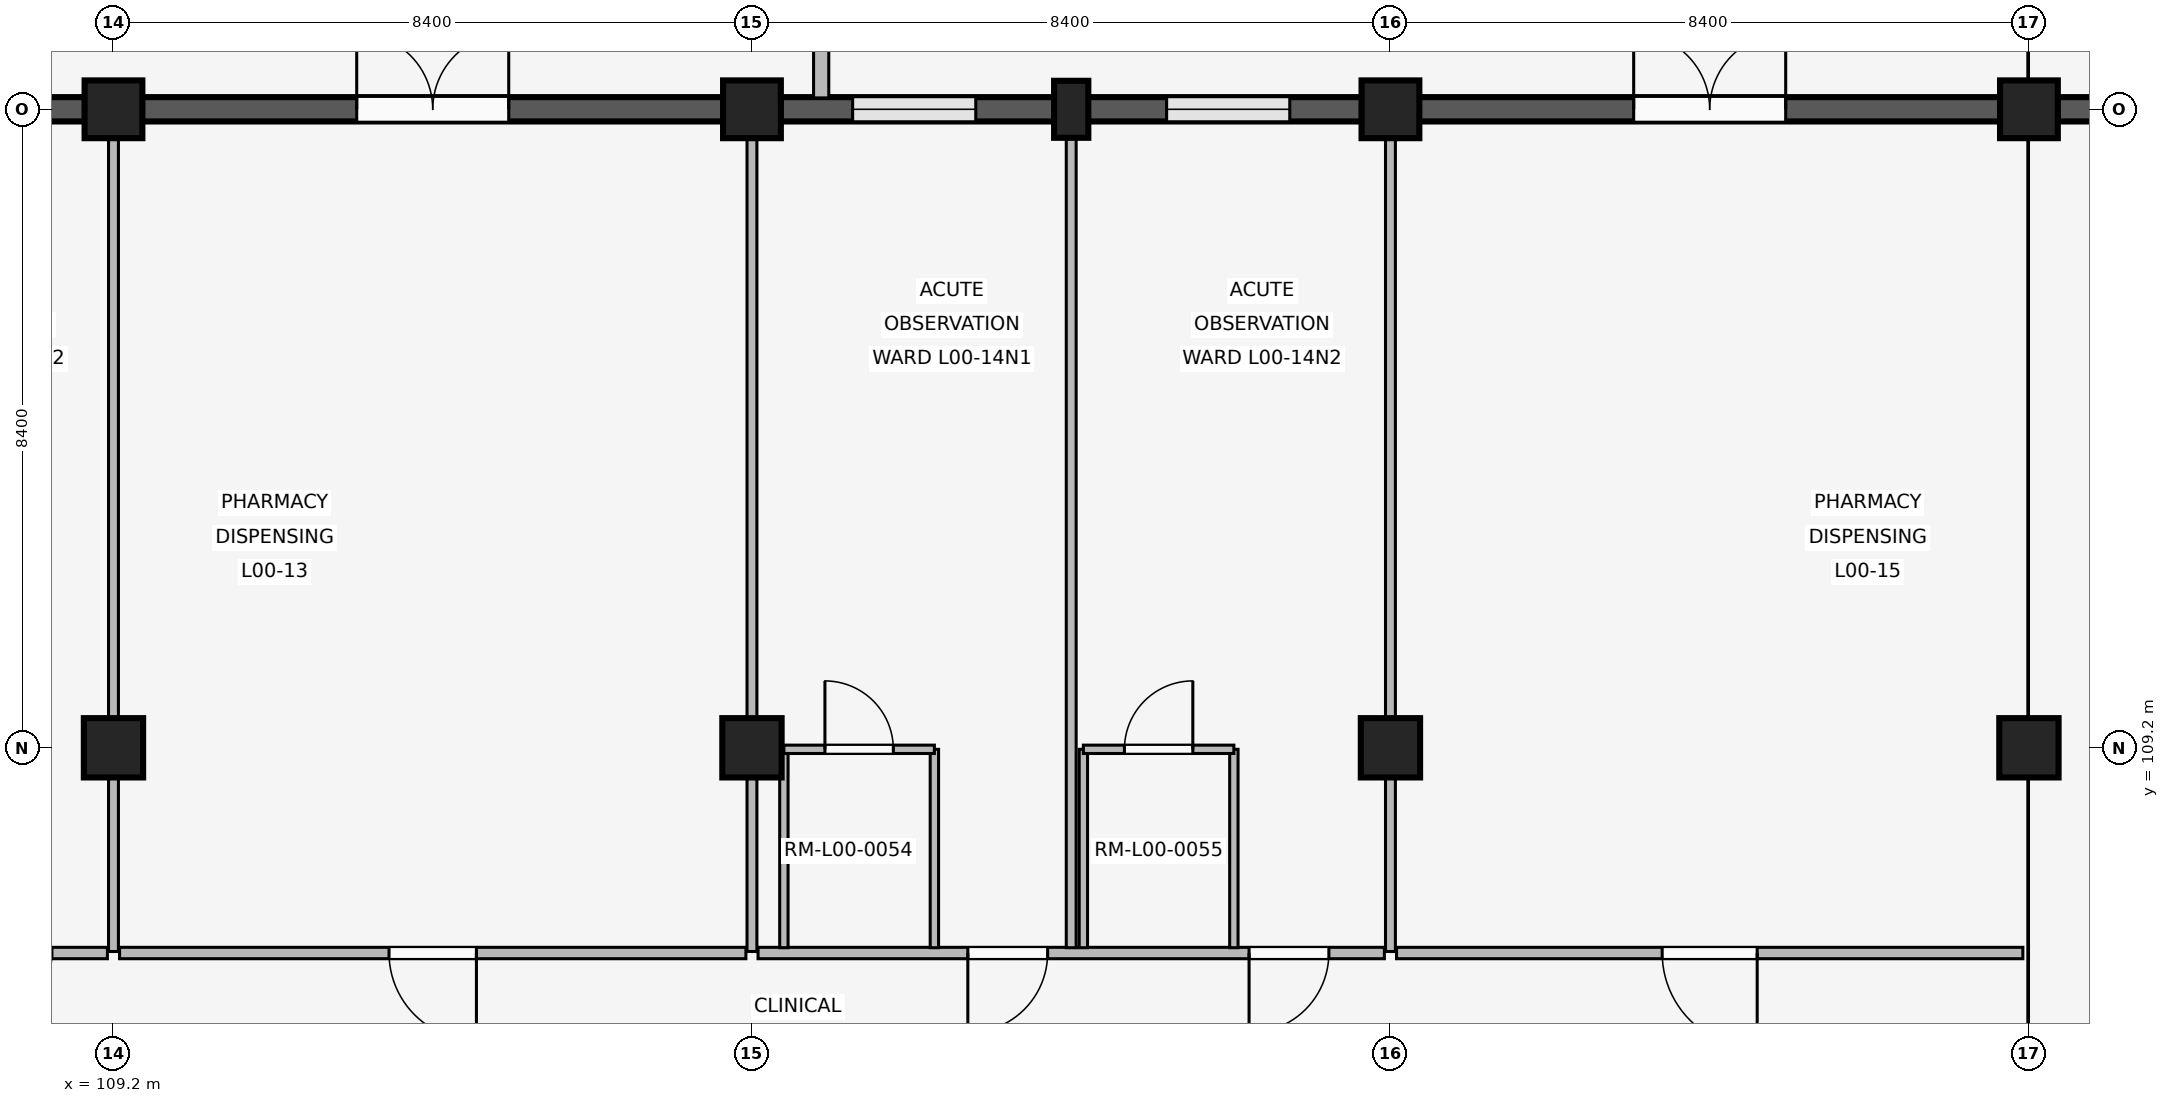
"""IFC4 building model, lengths in metres.
Left out: names, types, materials, properties, quantities, classifications, styles, units other than length and angle.
Written with IfcOpenShell. Run it as: python <this file> out.ifc"""

import sys

from ifc_helpers import new_model, si_unit, direction, frame, frame_2d, origin, origin_2d, place, context, subcontext, project, spatial, rectangle, extrude, element, fill, save


model = new_model("IFC4")
c1 = context("Model", 3, precision=1e-05, world=origin(), true_north=direction((0.0, 1.0)))
c2 = subcontext(c1, "Body", "Model", "MODEL_VIEW")
j1 = project(units=[si_unit("LENGTHUNIT", "METRE"), si_unit("PLANEANGLEUNIT", "RADIAN")], contexts=[c1])
p1 = place(None, origin())
s1 = spatial("IfcSite", under=j1, at=p1, CompositionType="ELEMENT")
p2 = place(p1, origin())
s2 = spatial("IfcBuilding", under=s1, at=p2, CompositionType="ELEMENT")
p3 = place(p2, origin())
s3 = spatial("IfcBuildingStorey", under=s2, at=p3, CompositionType="ELEMENT", Elevation=0.0)
p4 = place(p3, frame((109.2, 109.2, 0.0), z_axis=(0.0, 0.0, 1.0), x_axis=(1.0, 0.0, 0.0)))
e1 = element("IfcColumn", 1, at=p4, inside=s3, PredefinedType="COLUMN", context=c2, shape_type="SweptSolid", body=[
    extrude(rectangle(XDim=0.78, YDim=0.78, at=origin_2d()), origin(), (0.0, 0.0, 1.0), 4.8),
])
p5 = place(p3, frame((109.2, 117.6, 0.0), z_axis=(0.0, 0.0, 1.0), x_axis=(1.0, 0.0, 0.0)))
e2 = element("IfcColumn", 2, at=p5, inside=s3, PredefinedType="COLUMN", context=c2, shape_type="SweptSolid", body=[
    extrude(rectangle(XDim=0.76, YDim=0.76, at=origin_2d()), origin(), (0.0, 0.0, 1.0), 4.8),
])
p6 = place(p3, frame((117.6, 109.2, 0.0), z_axis=(0.0, 0.0, 1.0), x_axis=(1.0, 0.0, 0.0)))
e3 = element("IfcColumn", 3, at=p6, inside=s3, PredefinedType="COLUMN", context=c2, shape_type="SweptSolid", body=[
    extrude(rectangle(XDim=0.78, YDim=0.78, at=origin_2d()), origin(), (0.0, 0.0, 1.0), 4.8),
])
p7 = place(p3, frame((117.6, 117.6, 0.0), z_axis=(0.0, 0.0, 1.0), x_axis=(1.0, 0.0, 0.0)))
e4 = element("IfcColumn", 4, at=p7, inside=s3, PredefinedType="COLUMN", context=c2, shape_type="SweptSolid", body=[
    extrude(rectangle(XDim=0.76, YDim=0.76, at=origin_2d()), origin(), (0.0, 0.0, 1.0), 4.8),
])
p8 = place(p3, frame((126.0, 109.2, 0.0), z_axis=(0.0, 0.0, 1.0), x_axis=(1.0, 0.0, 0.0)))
e5 = element("IfcColumn", 5, at=p8, inside=s3, PredefinedType="COLUMN", context=c2, shape_type="SweptSolid", body=[
    extrude(rectangle(XDim=0.78, YDim=0.78, at=origin_2d()), origin(), (0.0, 0.0, 1.0), 4.8),
])
p9 = place(p3, frame((126.0, 117.6, 0.0), z_axis=(0.0, 0.0, 1.0), x_axis=(1.0, 0.0, 0.0)))
e6 = element("IfcColumn", 6, at=p9, inside=s3, PredefinedType="COLUMN", context=c2, shape_type="SweptSolid", body=[
    extrude(rectangle(XDim=0.76, YDim=0.76, at=origin_2d()), origin(), (0.0, 0.0, 1.0), 4.8),
])
p10 = place(p3, frame((134.4, 109.2, 0.0), z_axis=(0.0, 0.0, 1.0), x_axis=(1.0, 0.0, 0.0)))
e7 = element("IfcColumn", 7, at=p10, inside=s3, PredefinedType="COLUMN", context=c2, shape_type="SweptSolid", body=[
    extrude(rectangle(XDim=0.78, YDim=0.78, at=origin_2d()), origin(), (0.0, 0.0, 1.0), 4.8),
])
p11 = place(p3, frame((134.4, 117.6, 0.0), z_axis=(0.0, 0.0, 1.0), x_axis=(1.0, 0.0, 0.0)))
e8 = element("IfcColumn", 8, at=p11, inside=s3, PredefinedType="COLUMN", context=c2, shape_type="SweptSolid", body=[
    extrude(rectangle(XDim=0.76, YDim=0.76, at=origin_2d()), origin(), (0.0, 0.0, 1.0), 4.8),
])
p12 = place(p3, frame((121.8, 117.6, 0.0), z_axis=(0.0, 0.0, 1.0), x_axis=(1.0, 0.0, 0.0)))
e9 = element("IfcColumn", 9, at=p12, inside=s3, PredefinedType="PILASTER", context=c2, shape_type="SweptSolid", body=[
    extrude(rectangle(XDim=0.45, YDim=0.75, at=origin_2d()), origin(), (0.0, 0.0, 1.0), 4.8),
])
p13 = place(p3, frame((101.175, 117.6, 0.0), z_axis=(0.0, 0.0, 1.0), x_axis=(1.0, 0.0, 0.0)))
e10 = element("IfcWall", 10, at=p13, inside=s3, PredefinedType="SOLIDWALL", context=c2, shape_type="SweptSolid", body=[
    extrude(rectangle(XDim=7.65, YDim=0.32, at=frame_2d((3.825, 0.0))), origin(), (0.0, 0.0, 1.0), 3.82),
])
p14 = place(p13, frame((1.119, 0.0, 0.85)))
e11 = element("IfcOpeningElement", 11, at=p14, cuts=e10, PredefinedType="OPENING", context=c2, shape_type="SweptSolid", body=[
    extrude(rectangle(XDim=1.28, YDim=1.38, at=frame_2d((0.64, 0.69))), frame((0.0, 0.17, 0.0), z_axis=(0.0, -1.0, 0.0), x_axis=(1.0, 0.0, 0.0)), (0.0, 0.0, 1.0), 0.34),
])
p15 = place(p13, frame((5.25, 0.0, 0.85)))
e12 = element("IfcOpeningElement", 12, at=p15, cuts=e10, PredefinedType="OPENING", context=c2, shape_type="SweptSolid", body=[
    extrude(rectangle(XDim=1.28, YDim=1.38, at=frame_2d((0.64, 0.69))), frame((0.0, 0.17, 0.0), z_axis=(0.0, -1.0, 0.0), x_axis=(1.0, 0.0, 0.0)), (0.0, 0.0, 1.0), 0.34),
])
p16 = place(p3, frame((109.575, 117.6, 0.0), z_axis=(0.0, 0.0, 1.0), x_axis=(1.0, 0.0, 0.0)))
e13 = element("IfcWall", 13, at=p16, inside=s3, PredefinedType="SOLIDWALL", context=c2, shape_type="SweptSolid", body=[
    extrude(rectangle(XDim=7.65, YDim=0.32, at=frame_2d((3.825, 0.0))), origin(), (0.0, 0.0, 1.0), 3.82),
])
p17 = place(p16, frame((2.825, 0.0, 0.0)))
e14 = element("IfcOpeningElement", 14, at=p17, cuts=e13, PredefinedType="OPENING", context=c2, shape_type="SweptSolid", body=[
    extrude(rectangle(XDim=2.0, YDim=2.4, at=frame_2d((1.0, 1.2))), frame((0.0, 0.17, 0.0), z_axis=(0.0, -1.0, 0.0), x_axis=(1.0, 0.0, 0.0)), (0.0, 0.0, 1.0), 0.34),
])
p18 = place(p3, frame((117.975, 117.6, 0.0), z_axis=(0.0, 0.0, 1.0), x_axis=(1.0, 0.0, 0.0)))
e15 = element("IfcWall", 15, at=p18, inside=s3, PredefinedType="SOLIDWALL", context=c2, shape_type="SweptSolid", body=[
    extrude(rectangle(XDim=7.65, YDim=0.32, at=frame_2d((3.825, 0.0))), origin(), (0.0, 0.0, 1.0), 3.82),
])
p19 = place(p18, frame((0.949, 0.0, 0.85)))
e16 = element("IfcOpeningElement", 16, at=p19, cuts=e15, PredefinedType="OPENING", context=c2, shape_type="SweptSolid", body=[
    extrude(rectangle(XDim=1.62, YDim=1.52, at=frame_2d((0.81, 0.76))), frame((0.0, 0.17, 0.0), z_axis=(0.0, -1.0, 0.0), x_axis=(1.0, 0.0, 0.0)), (0.0, 0.0, 1.0), 0.34),
])
p20 = place(p18, frame((5.081, 0.0, 0.85)))
e17 = element("IfcOpeningElement", 17, at=p20, cuts=e15, PredefinedType="OPENING", context=c2, shape_type="SweptSolid", body=[
    extrude(rectangle(XDim=1.62, YDim=1.52, at=frame_2d((0.81, 0.76))), frame((0.0, 0.17, 0.0), z_axis=(0.0, -1.0, 0.0), x_axis=(1.0, 0.0, 0.0)), (0.0, 0.0, 1.0), 0.34),
])
p21 = place(p3, frame((118.51, 117.75, 0.0), z_axis=(0.0, 0.0, 1.0), x_axis=(0.0, 1.0, 0.0)))
e18 = element("IfcWall", 18, at=p21, inside=s3, PredefinedType="ELEMENTEDWALL", context=c2, shape_type="SweptSolid", body=[
    extrude(rectangle(XDim=0.85, YDim=0.2, at=frame_2d((0.425, 0.0))), origin(), (0.0, 0.0, 1.0), 3.8),
])
p22 = place(p3, frame((126.375, 117.6, 0.0), z_axis=(0.0, 0.0, 1.0), x_axis=(1.0, 0.0, 0.0)))
e19 = element("IfcWall", 19, at=p22, inside=s3, PredefinedType="SOLIDWALL", context=c2, shape_type="SweptSolid", body=[
    extrude(rectangle(XDim=7.65, YDim=0.32, at=frame_2d((3.825, 0.0))), origin(), (0.0, 0.0, 1.0), 3.82),
])
p23 = place(p22, frame((2.825, 0.0, 0.0)))
e20 = element("IfcOpeningElement", 20, at=p23, cuts=e19, PredefinedType="OPENING", context=c2, shape_type="SweptSolid", body=[
    extrude(rectangle(XDim=2.0, YDim=2.4, at=frame_2d((1.0, 1.2))), frame((0.0, 0.17, 0.0), z_axis=(0.0, -1.0, 0.0), x_axis=(1.0, 0.0, 0.0)), (0.0, 0.0, 1.0), 0.34),
])
p24 = place(p3, frame((134.775, 117.6, 0.0), z_axis=(0.0, 0.0, 1.0), x_axis=(1.0, 0.0, 0.0)))
e21 = element("IfcWall", 21, at=p24, inside=s3, PredefinedType="SOLIDWALL", context=c2, shape_type="SweptSolid", body=[
    extrude(rectangle(XDim=7.65, YDim=0.32, at=frame_2d((3.825, 0.0))), origin(), (0.0, 0.0, 1.0), 3.82),
])
p25 = place(p24, frame((1.0, 0.0, 0.85)))
e22 = element("IfcOpeningElement", 22, at=p25, cuts=e21, PredefinedType="OPENING", context=c2, shape_type="SweptSolid", body=[
    extrude(rectangle(XDim=1.52, YDim=1.65, at=frame_2d((0.76, 0.825))), frame((0.0, 0.17, 0.0), z_axis=(0.0, -1.0, 0.0), x_axis=(1.0, 0.0, 0.0)), (0.0, 0.0, 1.0), 0.34),
])
p26 = place(p24, frame((5.131, 0.0, 0.85)))
e23 = element("IfcOpeningElement", 23, at=p26, cuts=e21, PredefinedType="OPENING", context=c2, shape_type="SweptSolid", body=[
    extrude(rectangle(XDim=1.52, YDim=1.65, at=frame_2d((0.76, 0.825))), frame((0.0, 0.17, 0.0), z_axis=(0.0, -1.0, 0.0), x_axis=(1.0, 0.0, 0.0)), (0.0, 0.0, 1.0), 0.34),
])
p27 = place(p3, frame((109.12, 106.5, 0.0), z_axis=(0.0, 0.0, 1.0), x_axis=(-1.0, 0.0, 0.0)))
e24 = element("IfcWall", 24, at=p27, inside=s3, PredefinedType="PARTITIONING", context=c2, shape_type="SweptSolid", body=[
    extrude(rectangle(XDim=8.24, YDim=0.15, at=frame_2d((4.12, 0.0))), origin(), (0.0, 0.0, 1.0), 3.8),
])
p28 = place(p27, frame((0.73, 0.0, 0.0)))
e25 = element("IfcOpeningElement", 25, at=p28, cuts=e24, PredefinedType="OPENING", context=c2, shape_type="SweptSolid", body=[
    extrude(rectangle(XDim=1.05, YDim=2.2, at=frame_2d((0.525, 1.1))), frame((0.0, 0.085, 0.0), z_axis=(0.0, -1.0, 0.0), x_axis=(1.0, 0.0, 0.0)), (0.0, 0.0, 1.0), 0.17),
])
p29 = place(p27, frame((4.43, 0.0, 0.0)))
e26 = element("IfcOpeningElement", 26, at=p29, cuts=e24, PredefinedType="OPENING", context=c2, shape_type="SweptSolid", body=[
    extrude(rectangle(XDim=1.05, YDim=2.2, at=frame_2d((0.525, 1.1))), frame((0.0, 0.085, 0.0), z_axis=(0.0, -1.0, 0.0), x_axis=(1.0, 0.0, 0.0)), (0.0, 0.0, 1.0), 0.17),
])
p30 = place(p3, frame((109.2, 106.52, 0.0), z_axis=(0.0, 0.0, 1.0), x_axis=(0.0, 1.0, 0.0)))
e27 = element("IfcWall", 27, at=p30, inside=s3, PredefinedType="PARTITIONING", context=c2, shape_type="SweptSolid", body=[
    extrude(rectangle(XDim=10.94, YDim=0.13, at=frame_2d((5.47, 0.0))), origin(), (0.0, 0.0, 1.0), 3.8),
])
p31 = place(p3, frame((117.52, 106.5, 0.0), z_axis=(0.0, 0.0, 1.0), x_axis=(-1.0, 0.0, 0.0)))
e28 = element("IfcWall", 28, at=p31, inside=s3, PredefinedType="PARTITIONING", context=c2, shape_type="SweptSolid", body=[
    extrude(rectangle(XDim=8.24, YDim=0.15, at=frame_2d((4.12, 0.0))), origin(), (0.0, 0.0, 1.0), 3.8),
])
p32 = place(p31, frame((3.545, 0.0, 0.0)))
e29 = element("IfcOpeningElement", 29, at=p32, cuts=e28, PredefinedType="OPENING", context=c2, shape_type="SweptSolid", body=[
    extrude(rectangle(XDim=1.15, YDim=2.2, at=frame_2d((0.575, 1.1))), frame((0.0, 0.085, 0.0), z_axis=(0.0, -1.0, 0.0), x_axis=(1.0, 0.0, 0.0)), (0.0, 0.0, 1.0), 0.17),
])
p33 = place(p3, frame((117.6, 106.52, 0.0), z_axis=(0.0, 0.0, 1.0), x_axis=(0.0, 1.0, 0.0)))
e30 = element("IfcWall", 30, at=p33, inside=s3, PredefinedType="PARTITIONING", context=c2, shape_type="SweptSolid", body=[
    extrude(rectangle(XDim=10.94, YDim=0.13, at=frame_2d((5.47, 0.0))), origin(), (0.0, 0.0, 1.0), 3.8),
])
p34 = place(p3, frame((125.92, 106.5, 0.0), z_axis=(0.0, 0.0, 1.0), x_axis=(-1.0, 0.0, 0.0)))
e31 = element("IfcWall", 31, at=p34, inside=s3, PredefinedType="PARTITIONING", context=c2, shape_type="SweptSolid", body=[
    extrude(rectangle(XDim=8.24, YDim=0.15, at=frame_2d((4.12, 0.0))), origin(), (0.0, 0.0, 1.0), 3.8),
])
p35 = place(p34, frame((0.73, 0.0, 0.0)))
e32 = element("IfcOpeningElement", 32, at=p35, cuts=e31, PredefinedType="OPENING", context=c2, shape_type="SweptSolid", body=[
    extrude(rectangle(XDim=1.05, YDim=2.2, at=frame_2d((0.525, 1.1))), frame((0.0, 0.085, 0.0), z_axis=(0.0, -1.0, 0.0), x_axis=(1.0, 0.0, 0.0)), (0.0, 0.0, 1.0), 0.17),
])
p36 = place(p34, frame((4.43, 0.0, 0.0)))
e33 = element("IfcOpeningElement", 33, at=p36, cuts=e31, PredefinedType="OPENING", context=c2, shape_type="SweptSolid", body=[
    extrude(rectangle(XDim=1.05, YDim=2.2, at=frame_2d((0.525, 1.1))), frame((0.0, 0.085, 0.0), z_axis=(0.0, -1.0, 0.0), x_axis=(1.0, 0.0, 0.0)), (0.0, 0.0, 1.0), 0.17),
])
p37 = place(p3, frame((121.8, 106.57, 0.0), z_axis=(0.0, 0.0, 1.0), x_axis=(0.0, 1.0, 0.0)))
e34 = element("IfcWall", 34, at=p37, inside=s3, PredefinedType="PARTITIONING", context=c2, shape_type="SweptSolid", body=[
    extrude(rectangle(XDim=10.93, YDim=0.13, at=frame_2d((5.465, 0.0))), origin(), (0.0, 0.0, 1.0), 3.8),
])
for number, where, z_axis, x_axis in (
    (35, (118.02, 106.57, 0.0), (0.0, 0.0, 1.0), (0.0, 1.0, 0.0)),
    (36, (120.0, 106.57, 0.0), (0.0, 0.0, 1.0), (0.0, 1.0, 0.0)),
):
    element("IfcWall", number, at=place(p3, frame(where, z_axis=z_axis, x_axis=x_axis)), inside=s3, PredefinedType="PARTITIONING", context=c2, shape_type="SweptSolid", body=[
        extrude(rectangle(XDim=2.61, YDim=0.11, at=frame_2d((1.305, 0.0))), origin(), (0.0, 0.0, 1.0), 3.8),
    ])
p38 = place(p3, frame((118.02, 109.18, 0.0), z_axis=(0.0, 0.0, 1.0), x_axis=(1.0, 0.0, 0.0)))
e37 = element("IfcWall", 37, at=p38, inside=s3, PredefinedType="PARTITIONING", context=c2, shape_type="SweptSolid", body=[
    extrude(rectangle(XDim=1.98, YDim=0.11, at=frame_2d((0.99, 0.0))), origin(), (0.0, 0.0, 1.0), 3.8),
])
p39 = place(p38, frame((0.54, 0.0, 0.0)))
e38 = element("IfcOpeningElement", 38, at=p39, cuts=e37, PredefinedType="OPENING", context=c2, shape_type="SweptSolid", body=[
    extrude(rectangle(XDim=0.9, YDim=2.1, at=frame_2d((0.45, 1.05))), frame((0.0, 0.065, 0.0), z_axis=(0.0, -1.0, 0.0), x_axis=(1.0, 0.0, 0.0)), (0.0, 0.0, 1.0), 0.13),
])
for number, where, z_axis, x_axis in (
    (39, (121.96, 106.57, 0.0), (0.0, 0.0, 1.0), (0.0, 1.0, 0.0)),
    (40, (123.94, 106.57, 0.0), (0.0, 0.0, 1.0), (0.0, 1.0, 0.0)),
):
    element("IfcWall", number, at=place(p3, frame(where, z_axis=z_axis, x_axis=x_axis)), inside=s3, PredefinedType="PARTITIONING", context=c2, shape_type="SweptSolid", body=[
        extrude(rectangle(XDim=2.61, YDim=0.11, at=frame_2d((1.305, 0.0))), origin(), (0.0, 0.0, 1.0), 3.8),
    ])
p40 = place(p3, frame((121.96, 109.18, 0.0), z_axis=(0.0, 0.0, 1.0), x_axis=(1.0, 0.0, 0.0)))
e41 = element("IfcWall", 41, at=p40, inside=s3, PredefinedType="PARTITIONING", context=c2, shape_type="SweptSolid", body=[
    extrude(rectangle(XDim=1.98, YDim=0.11, at=frame_2d((0.99, 0.0))), origin(), (0.0, 0.0, 1.0), 3.8),
])
p41 = place(p40, frame((0.54, 0.0, 0.0)))
e42 = element("IfcOpeningElement", 42, at=p41, cuts=e41, PredefinedType="OPENING", context=c2, shape_type="SweptSolid", body=[
    extrude(rectangle(XDim=0.9, YDim=2.1, at=frame_2d((0.45, 1.05))), frame((0.0, 0.065, 0.0), z_axis=(0.0, -1.0, 0.0), x_axis=(1.0, 0.0, 0.0)), (0.0, 0.0, 1.0), 0.13),
])
p42 = place(p3, frame((126.0, 106.52, 0.0), z_axis=(0.0, 0.0, 1.0), x_axis=(0.0, 1.0, 0.0)))
e43 = element("IfcWall", 43, at=p42, inside=s3, PredefinedType="PARTITIONING", context=c2, shape_type="SweptSolid", body=[
    extrude(rectangle(XDim=10.94, YDim=0.13, at=frame_2d((5.47, 0.0))), origin(), (0.0, 0.0, 1.0), 3.8),
])
p43 = place(p3, frame((134.32, 106.5, 0.0), z_axis=(0.0, 0.0, 1.0), x_axis=(-1.0, 0.0, 0.0)))
e44 = element("IfcWall", 44, at=p43, inside=s3, PredefinedType="PARTITIONING", context=c2, shape_type="SweptSolid", body=[
    extrude(rectangle(XDim=8.24, YDim=0.15, at=frame_2d((4.12, 0.0))), origin(), (0.0, 0.0, 1.0), 3.8),
])
p44 = place(p43, frame((3.495, 0.0, 0.0)))
e45 = element("IfcOpeningElement", 45, at=p44, cuts=e44, PredefinedType="OPENING", context=c2, shape_type="SweptSolid", body=[
    extrude(rectangle(XDim=1.25, YDim=2.2, at=frame_2d((0.625, 1.1))), frame((0.0, 0.085, 0.0), z_axis=(0.0, -1.0, 0.0), x_axis=(1.0, 0.0, 0.0)), (0.0, 0.0, 1.0), 0.17),
])
p45 = place(p17, origin())
e46 = element("IfcDoor", 46, at=p45, inside=s3, OperationType="DOUBLE_SWING_LEFT", PredefinedType="DOOR", context=c2, shape_type="SweptSolid", body=[
    extrude(rectangle(XDim=2.0, YDim=2.4, at=frame_2d((1.0, 1.2))), frame((0.0, 0.025, 0.0), z_axis=(0.0, -1.0, 0.0), x_axis=(1.0, 0.0, 0.0)), (0.0, 0.0, 1.0), 0.05),
])
fill(e14, e46)
p46 = place(p19, origin())
e47 = element("IfcWindow", 47, at=p46, inside=s3, PartitioningType="SINGLE_PANEL", PredefinedType="WINDOW", context=c2, shape_type="SweptSolid", body=[
    extrude(rectangle(XDim=1.62, YDim=1.52, at=frame_2d((0.81, 0.76))), frame((0.0, 0.03, 0.0), z_axis=(0.0, -1.0, 0.0), x_axis=(1.0, 0.0, 0.0)), (0.0, 0.0, 1.0), 0.06),
])
fill(e16, e47)
p47 = place(p20, origin())
e48 = element("IfcWindow", 48, at=p47, inside=s3, PartitioningType="SINGLE_PANEL", PredefinedType="WINDOW", context=c2, shape_type="SweptSolid", body=[
    extrude(rectangle(XDim=1.62, YDim=1.52, at=frame_2d((0.81, 0.76))), frame((0.0, 0.03, 0.0), z_axis=(0.0, -1.0, 0.0), x_axis=(1.0, 0.0, 0.0)), (0.0, 0.0, 1.0), 0.06),
])
fill(e17, e48)
p48 = place(p23, origin())
e49 = element("IfcDoor", 49, at=p48, inside=s3, OperationType="DOUBLE_SWING_LEFT", PredefinedType="DOOR", context=c2, shape_type="SweptSolid", body=[
    extrude(rectangle(XDim=2.0, YDim=2.4, at=frame_2d((1.0, 1.2))), frame((0.0, 0.025, 0.0), z_axis=(0.0, -1.0, 0.0), x_axis=(1.0, 0.0, 0.0)), (0.0, 0.0, 1.0), 0.05),
])
fill(e20, e49)
p49 = place(p32, origin())
e50 = element("IfcDoor", 50, at=p49, inside=s3, OperationType="SINGLE_SWING_LEFT", PredefinedType="DOOR", context=c2, shape_type="SweptSolid", body=[
    extrude(rectangle(XDim=1.15, YDim=2.2, at=frame_2d((0.575, 1.1))), frame((0.0, 0.025, 0.0), z_axis=(0.0, -1.0, 0.0), x_axis=(1.0, 0.0, 0.0)), (0.0, 0.0, 1.0), 0.05),
])
fill(e29, e50)
p50 = place(p35, origin())
e51 = element("IfcDoor", 51, at=p50, inside=s3, OperationType="SINGLE_SWING_RIGHT", PredefinedType="DOOR", context=c2, shape_type="SweptSolid", body=[
    extrude(rectangle(XDim=1.05, YDim=2.2, at=frame_2d((0.525, 1.1))), frame((0.0, 0.025, 0.0), z_axis=(0.0, -1.0, 0.0), x_axis=(1.0, 0.0, 0.0)), (0.0, 0.0, 1.0), 0.05),
])
fill(e32, e51)
p51 = place(p36, origin())
e52 = element("IfcDoor", 52, at=p51, inside=s3, OperationType="SINGLE_SWING_RIGHT", PredefinedType="DOOR", context=c2, shape_type="SweptSolid", body=[
    extrude(rectangle(XDim=1.05, YDim=2.2, at=frame_2d((0.525, 1.1))), frame((0.0, 0.025, 0.0), z_axis=(0.0, -1.0, 0.0), x_axis=(1.0, 0.0, 0.0)), (0.0, 0.0, 1.0), 0.05),
])
fill(e33, e52)
p52 = place(p39, origin())
e53 = element("IfcDoor", 53, at=p52, inside=s3, OperationType="SINGLE_SWING_LEFT", PredefinedType="DOOR", context=c2, shape_type="SweptSolid", body=[
    extrude(rectangle(XDim=0.9, YDim=2.1, at=frame_2d((0.45, 1.05))), frame((0.0, 0.025, 0.0), z_axis=(0.0, -1.0, 0.0), x_axis=(1.0, 0.0, 0.0)), (0.0, 0.0, 1.0), 0.05),
])
fill(e38, e53)
p53 = place(p41, origin())
e54 = element("IfcDoor", 54, at=p53, inside=s3, OperationType="SINGLE_SWING_RIGHT", PredefinedType="DOOR", context=c2, shape_type="SweptSolid", body=[
    extrude(rectangle(XDim=0.9, YDim=2.1, at=frame_2d((0.45, 1.05))), frame((0.0, 0.025, 0.0), z_axis=(0.0, -1.0, 0.0), x_axis=(1.0, 0.0, 0.0)), (0.0, 0.0, 1.0), 0.05),
])
fill(e42, e54)
p54 = place(p44, origin())
e55 = element("IfcDoor", 55, at=p54, inside=s3, OperationType="SINGLE_SWING_LEFT", PredefinedType="DOOR", context=c2, shape_type="SweptSolid", body=[
    extrude(rectangle(XDim=1.25, YDim=2.2, at=frame_2d((0.625, 1.1))), frame((0.0, 0.025, 0.0), z_axis=(0.0, -1.0, 0.0), x_axis=(1.0, 0.0, 0.0)), (0.0, 0.0, 1.0), 0.05),
])
fill(e45, e55)
save(model, sys.argv[1])
